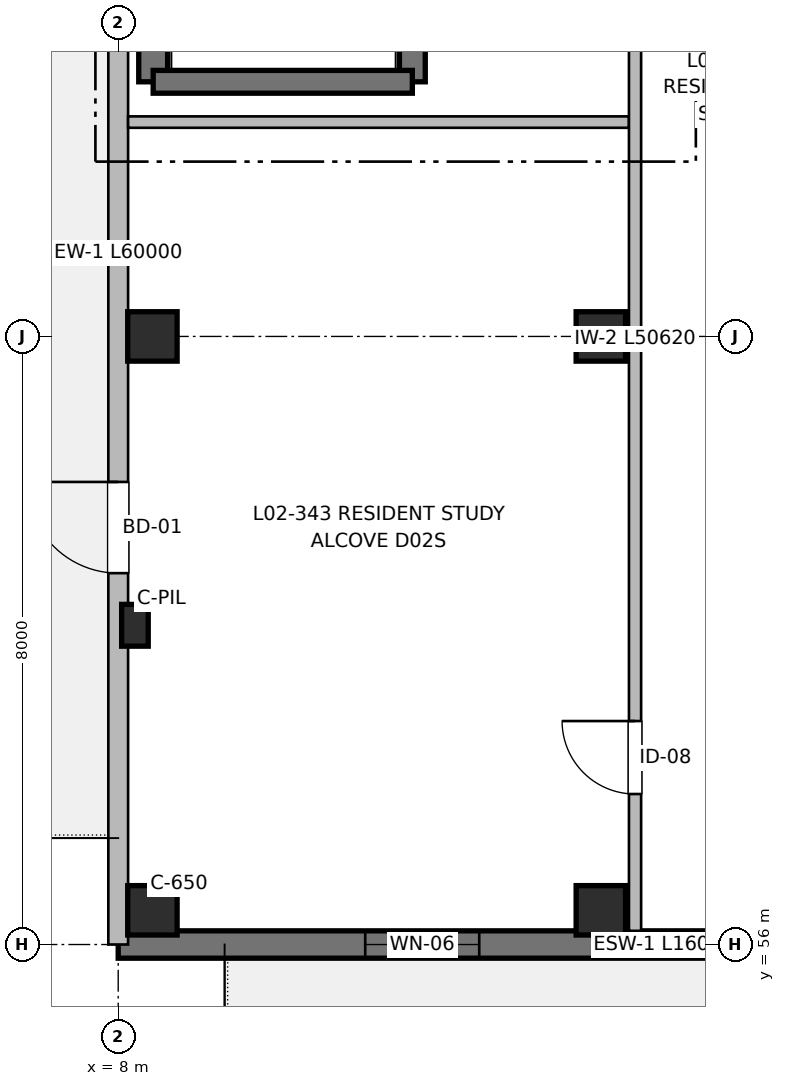
"""IFC4 building model, lengths in metres.
Left out: names, types, materials, properties, quantities, classifications, styles, units other than length and angle.
Written with IfcOpenShell. Run it as: python <this file> out.ifc"""

import sys

from ifc_helpers import new_model, si_unit, direction, frame, frame_2d, origin, origin_2d, place, context, subcontext, project, spatial, rectangle, extrude, element, fill, save


model = new_model("IFC4")
c1 = context("Model", 3, precision=1e-05, world=origin(), true_north=direction((0.0, 1.0)))
c2 = subcontext(c1, "Body", "Model", "MODEL_VIEW")
j1 = project(units=[si_unit("LENGTHUNIT", "METRE"), si_unit("PLANEANGLEUNIT", "RADIAN")], contexts=[c1])
p1 = place(None, origin())
s1 = spatial("IfcSite", under=j1, at=p1, CompositionType="ELEMENT")
p2 = place(p1, origin())
s2 = spatial("IfcBuilding", under=s1, at=p2, CompositionType="ELEMENT")
p3 = place(p2, frame((0.0, 0.0, 7.36)))
s3 = spatial("IfcBuildingStorey", under=s2, at=p3, CompositionType="ELEMENT", Elevation=7.36)
p4 = place(p3, frame((8.22, 60.2, 0.0), z_axis=(0.0, 0.0, 1.0), x_axis=(1.0, 0.0, 0.0)))
e1 = element("IfcColumn", 1, at=p4, inside=s3, PredefinedType="PILASTER", context=c2, shape_type="SweptSolid", body=[
    extrude(rectangle(XDim=0.35, YDim=0.55, at=origin_2d()), origin(), (0.0, 0.0, 1.0), 3.2),
])
for number, where, z_axis, x_axis in (
    (2, (8.45, 56.45, 0.0), (0.0, 0.0, 1.0), (1.0, 0.0, 0.0)),
    (3, (8.45, 64.0, 0.0), (0.0, 0.0, 1.0), (1.0, 0.0, 0.0)),
    (4, (14.35, 56.45, 0.0), (0.0, 0.0, 1.0), (1.0, 0.0, 0.0)),
    (5, (14.35, 64.0, 0.0), (0.0, 0.0, 1.0), (1.0, 0.0, 0.0)),
):
    element("IfcColumn", number, at=place(p3, frame(where, z_axis=z_axis, x_axis=x_axis)), inside=s3, PredefinedType="COLUMN", context=c2, shape_type="SweptSolid", body=[
        extrude(rectangle(XDim=0.65, YDim=0.65, at=origin_2d()), origin(), (0.0, 0.0, 1.0), 3.2),
    ])
p5 = place(p3, frame((8.46, 67.35, 0.0), z_axis=(0.0, 0.0, 1.0), x_axis=(0.0, 1.0, 0.0)))
e6 = element("IfcWall", 6, at=p5, inside=s3, PredefinedType="SHEAR", context=c2, shape_type="SweptSolid", body=[
    extrude(rectangle(XDim=12.45, YDim=0.38, at=frame_2d((6.225, 0.0))), origin(), (0.0, 0.0, 1.0), 3.2),
])
p6 = place(p5, frame((2.2, 0.0, 0.97)))
e7 = element("IfcOpeningElement", 7, at=p6, cuts=e6, PredefinedType="OPENING", context=c2, shape_type="SweptSolid", body=[
    extrude(rectangle(XDim=0.95, YDim=1.25, at=frame_2d((0.475, 0.625))), frame((0.0, 0.2, 0.0), z_axis=(0.0, -1.0, 0.0), x_axis=(1.0, 0.0, 0.0)), (0.0, 0.0, 1.0), 0.4),
])
p7 = place(p3, frame((11.87, 79.8, 0.0), z_axis=(0.0, 0.0, 1.0), x_axis=(0.0, -1.0, 0.0)))
e8 = element("IfcWall", 8, at=p7, inside=s3, PredefinedType="SHEAR", context=c2, shape_type="SweptSolid", body=[
    extrude(rectangle(XDim=12.45, YDim=0.34, at=frame_2d((6.225, 0.0))), origin(), (0.0, 0.0, 1.0), 3.2),
])
p8 = place(p7, frame((10.85, 0.0, 0.0)))
e9 = element("IfcOpeningElement", 9, at=p8, cuts=e8, PredefinedType="OPENING", context=c2, shape_type="SweptSolid", body=[
    extrude(rectangle(XDim=1.05, YDim=2.15, at=frame_2d((0.525, 1.075))), frame((0.0, 0.18, 0.0), z_axis=(0.0, -1.0, 0.0), x_axis=(1.0, 0.0, 0.0)), (0.0, 0.0, 1.0), 0.36),
])
p9 = place(p3, frame((11.87, 67.35, 0.0), z_axis=(0.0, 0.0, 1.0), x_axis=(-1.0, 0.0, 0.0)))
e10 = element("IfcWall", 10, at=p9, inside=s3, PredefinedType="SHEAR", context=c2, shape_type="SweptSolid", body=[
    extrude(rectangle(XDim=3.41, YDim=0.3, at=frame_2d((1.705, 0.0))), origin(), (0.0, 0.0, 1.0), 3.2),
])
p10 = place(p3, frame((24.0, 56.0, 0.0), z_axis=(0.0, 0.0, 1.0), x_axis=(-1.0, 0.0, 0.0)))
e11 = element("IfcWall", 11, at=p10, inside=s3, PredefinedType="SHEAR", context=c2, shape_type="SweptSolid", body=[
    extrude(rectangle(XDim=16.0, YDim=0.36, at=frame_2d((8.0, 0.0))), origin(), (0.0, 0.0, 1.0), 2.98),
])
p11 = place(p10, frame((2.55, 0.0, 0.0)))
e12 = element("IfcOpeningElement", 12, at=p11, cuts=e11, PredefinedType="OPENING", context=c2, shape_type="SweptSolid", body=[
    extrude(rectangle(XDim=1.2, YDim=2.2, at=frame_2d((0.6, 1.1))), frame((0.0, 0.19, 0.0), z_axis=(0.0, -1.0, 0.0), x_axis=(1.0, 0.0, 0.0)), (0.0, 0.0, 1.0), 0.38),
])
p12 = place(p10, frame((4.85, 0.0, 0.82)))
e13 = element("IfcOpeningElement", 13, at=p12, cuts=e11, PredefinedType="OPENING", context=c2, shape_type="SweptSolid", body=[
    extrude(rectangle(XDim=1.55, YDim=1.4, at=frame_2d((0.775, 0.7))), frame((0.0, 0.19, 0.0), z_axis=(0.0, -1.0, 0.0), x_axis=(1.0, 0.0, 0.0)), (0.0, 0.0, 1.0), 0.38),
])
p13 = place(p10, frame((11.25, 0.0, 0.82)))
e14 = element("IfcOpeningElement", 14, at=p13, cuts=e11, PredefinedType="OPENING", context=c2, shape_type="SweptSolid", body=[
    extrude(rectangle(XDim=1.5, YDim=1.4, at=frame_2d((0.75, 0.7))), frame((0.0, 0.19, 0.0), z_axis=(0.0, -1.0, 0.0), x_axis=(1.0, 0.0, 0.0)), (0.0, 0.0, 1.0), 0.38),
])
p14 = place(p3, frame((8.0, 56.0, 0.0), z_axis=(0.0, 0.0, 1.0), x_axis=(0.0, 1.0, 0.0)))
e15 = element("IfcWall", 15, at=p14, inside=s3, PredefinedType="SOLIDWALL", context=c2, shape_type="SweptSolid", body=[
    extrude(rectangle(XDim=60.0, YDim=0.26, at=frame_2d((30.0, 0.0))), origin(), (0.0, 0.0, 1.0), 2.98),
])
p15 = place(p14, frame((4.886, 0.0, 0.0)))
e16 = element("IfcOpeningElement", 16, at=p15, cuts=e15, PredefinedType="OPENING", context=c2, shape_type="SweptSolid", body=[
    extrude(rectangle(XDim=1.2, YDim=2.2, at=frame_2d((0.6, 1.1))), frame((0.0, 0.14, 0.0), z_axis=(0.0, -1.0, 0.0), x_axis=(1.0, 0.0, 0.0)), (0.0, 0.0, 1.0), 0.28),
])
p16 = place(p14, frame((12.107, 0.0, 0.82)))
e17 = element("IfcOpeningElement", 17, at=p16, cuts=e15, PredefinedType="OPENING", context=c2, shape_type="SweptSolid", body=[
    extrude(rectangle(XDim=1.5, YDim=1.4, at=frame_2d((0.75, 0.7))), frame((0.0, 0.14, 0.0), z_axis=(0.0, -1.0, 0.0), x_axis=(1.0, 0.0, 0.0)), (0.0, 0.0, 1.0), 0.28),
])
p17 = place(p14, frame((19.804, 0.0, 0.82)))
e18 = element("IfcOpeningElement", 18, at=p17, cuts=e15, PredefinedType="OPENING", context=c2, shape_type="SweptSolid", body=[
    extrude(rectangle(XDim=1.55, YDim=1.4, at=frame_2d((0.775, 0.7))), frame((0.0, 0.14, 0.0), z_axis=(0.0, -1.0, 0.0), x_axis=(1.0, 0.0, 0.0)), (0.0, 0.0, 1.0), 0.28),
])
p18 = place(p14, frame((29.3, 0.0, 0.87)))
e19 = element("IfcOpeningElement", 19, at=p18, cuts=e15, PredefinedType="OPENING", context=c2, shape_type="SweptSolid", body=[
    extrude(rectangle(XDim=1.4, YDim=1.35, at=frame_2d((0.7, 0.675))), frame((0.0, 0.14, 0.0), z_axis=(0.0, -1.0, 0.0), x_axis=(1.0, 0.0, 0.0)), (0.0, 0.0, 1.0), 0.28),
])
p19 = place(p14, frame((40.946, 0.0, 0.87)))
e20 = element("IfcOpeningElement", 20, at=p19, cuts=e15, PredefinedType="OPENING", context=c2, shape_type="SweptSolid", body=[
    extrude(rectangle(XDim=1.25, YDim=1.35, at=frame_2d((0.625, 0.675))), frame((0.0, 0.14, 0.0), z_axis=(0.0, -1.0, 0.0), x_axis=(1.0, 0.0, 0.0)), (0.0, 0.0, 1.0), 0.28),
])
p20 = place(p14, frame((46.493, 0.0, 0.82)))
e21 = element("IfcOpeningElement", 21, at=p20, cuts=e15, PredefinedType="OPENING", context=c2, shape_type="SweptSolid", body=[
    extrude(rectangle(XDim=1.3, YDim=1.4, at=frame_2d((0.65, 0.7))), frame((0.0, 0.14, 0.0), z_axis=(0.0, -1.0, 0.0), x_axis=(1.0, 0.0, 0.0)), (0.0, 0.0, 1.0), 0.28),
])
p21 = place(p14, frame((55.514, 0.0, 0.67)))
e22 = element("IfcOpeningElement", 22, at=p21, cuts=e15, PredefinedType="OPENING", context=c2, shape_type="SweptSolid", body=[
    extrude(rectangle(XDim=2.1, YDim=1.55, at=frame_2d((1.05, 0.775))), frame((0.0, 0.14, 0.0), z_axis=(0.0, -1.0, 0.0), x_axis=(1.0, 0.0, 0.0)), (0.0, 0.0, 1.0), 0.28),
])
p22 = place(p3, frame((8.13, 66.82, 0.0), z_axis=(0.0, 0.0, 1.0), x_axis=(1.0, 0.0, 0.0)))
e23 = element("IfcWall", 23, at=p22, inside=s3, PredefinedType="PARTITIONING", context=c2, shape_type="SweptSolid", body=[
    extrude(rectangle(XDim=6.59, YDim=0.15, at=frame_2d((3.295, 0.0))), origin(), (0.0, 0.0, 1.0), 2.935),
])
p23 = place(p3, frame((14.8, 56.18, 0.0), z_axis=(0.0, 0.0, 1.0), x_axis=(0.0, 1.0, 0.0)))
e24 = element("IfcWall", 24, at=p23, inside=s3, PredefinedType="PARTITIONING", context=c2, shape_type="SweptSolid", body=[
    extrude(rectangle(XDim=50.62, YDim=0.16, at=frame_2d((25.31, 0.0))), origin(), (0.0, 0.0, 1.0), 2.935),
])
p24 = place(p23, frame((12.82, 0.0, 0.0)))
e25 = element("IfcOpeningElement", 25, at=p24, cuts=e24, PredefinedType="OPENING", context=c2, shape_type="SweptSolid", body=[
    extrude(rectangle(XDim=1.1, YDim=2.15, at=frame_2d((0.55, 1.075))), frame((0.0, 0.09, 0.0), z_axis=(0.0, -1.0, 0.0), x_axis=(1.0, 0.0, 0.0)), (0.0, 0.0, 1.0), 0.18),
])
p25 = place(p23, frame((19.22, 0.0, 0.0)))
e26 = element("IfcOpeningElement", 26, at=p25, cuts=e24, PredefinedType="OPENING", context=c2, shape_type="SweptSolid", body=[
    extrude(rectangle(XDim=1.6, YDim=2.15, at=frame_2d((0.8, 1.075))), frame((0.0, 0.09, 0.0), z_axis=(0.0, -1.0, 0.0), x_axis=(1.0, 0.0, 0.0)), (0.0, 0.0, 1.0), 0.18),
])
p26 = place(p23, frame((1.8, 0.0, 0.0)))
e27 = element("IfcOpeningElement", 27, at=p26, cuts=e24, PredefinedType="OPENING", context=c2, shape_type="SweptSolid", body=[
    extrude(rectangle(XDim=0.96, YDim=2.15, at=frame_2d((0.48, 1.075))), frame((0.0, 0.09, 0.0), z_axis=(0.0, -1.0, 0.0), x_axis=(1.0, 0.0, 0.0)), (0.0, 0.0, 1.0), 0.18),
])
p27 = place(p23, frame((32.625, 0.0, 0.0)))
e28 = element("IfcOpeningElement", 28, at=p27, cuts=e24, PredefinedType="OPENING", context=c2, shape_type="SweptSolid", body=[
    extrude(rectangle(XDim=0.98, YDim=2.15, at=frame_2d((0.49, 1.075))), frame((0.0, 0.09, 0.0), z_axis=(0.0, -1.0, 0.0), x_axis=(1.0, 0.0, 0.0)), (0.0, 0.0, 1.0), 0.18),
])
p28 = place(p23, frame((41.235, 0.0, 0.0)))
e29 = element("IfcOpeningElement", 29, at=p28, cuts=e24, PredefinedType="OPENING", context=c2, shape_type="SweptSolid", body=[
    extrude(rectangle(XDim=0.98, YDim=2.15, at=frame_2d((0.49, 1.075))), frame((0.0, 0.09, 0.0), z_axis=(0.0, -1.0, 0.0), x_axis=(1.0, 0.0, 0.0)), (0.0, 0.0, 1.0), 0.18),
])
p29 = place(p13, origin())
e30 = element("IfcWindow", 30, at=p29, inside=s3, PartitioningType="SINGLE_PANEL", PredefinedType="WINDOW", context=c2, shape_type="SweptSolid", body=[
    extrude(rectangle(XDim=1.5, YDim=1.4, at=frame_2d((0.75, 0.7))), frame((0.0, 0.03, 0.0), z_axis=(0.0, -1.0, 0.0), x_axis=(1.0, 0.0, 0.0)), (0.0, 0.0, 1.0), 0.06),
])
fill(e14, e30)
p30 = place(p15, origin())
e31 = element("IfcDoor", 31, at=p30, inside=s3, OperationType="SINGLE_SWING_RIGHT", PredefinedType="DOOR", context=c2, shape_type="SweptSolid", body=[
    extrude(rectangle(XDim=1.2, YDim=2.2, at=frame_2d((0.6, 1.1))), frame((0.0, 0.025, 0.0), z_axis=(0.0, -1.0, 0.0), x_axis=(1.0, 0.0, 0.0)), (0.0, 0.0, 1.0), 0.05),
])
fill(e16, e31)
p31 = place(p26, origin())
e32 = element("IfcDoor", 32, at=p31, inside=s3, OperationType="SINGLE_SWING_RIGHT", PredefinedType="DOOR", context=c2, shape_type="SweptSolid", body=[
    extrude(rectangle(XDim=0.96, YDim=2.15, at=frame_2d((0.48, 1.075))), frame((0.0, 0.025, 0.0), z_axis=(0.0, -1.0, 0.0), x_axis=(1.0, 0.0, 0.0)), (0.0, 0.0, 1.0), 0.05),
])
fill(e27, e32)
save(model, sys.argv[1])
